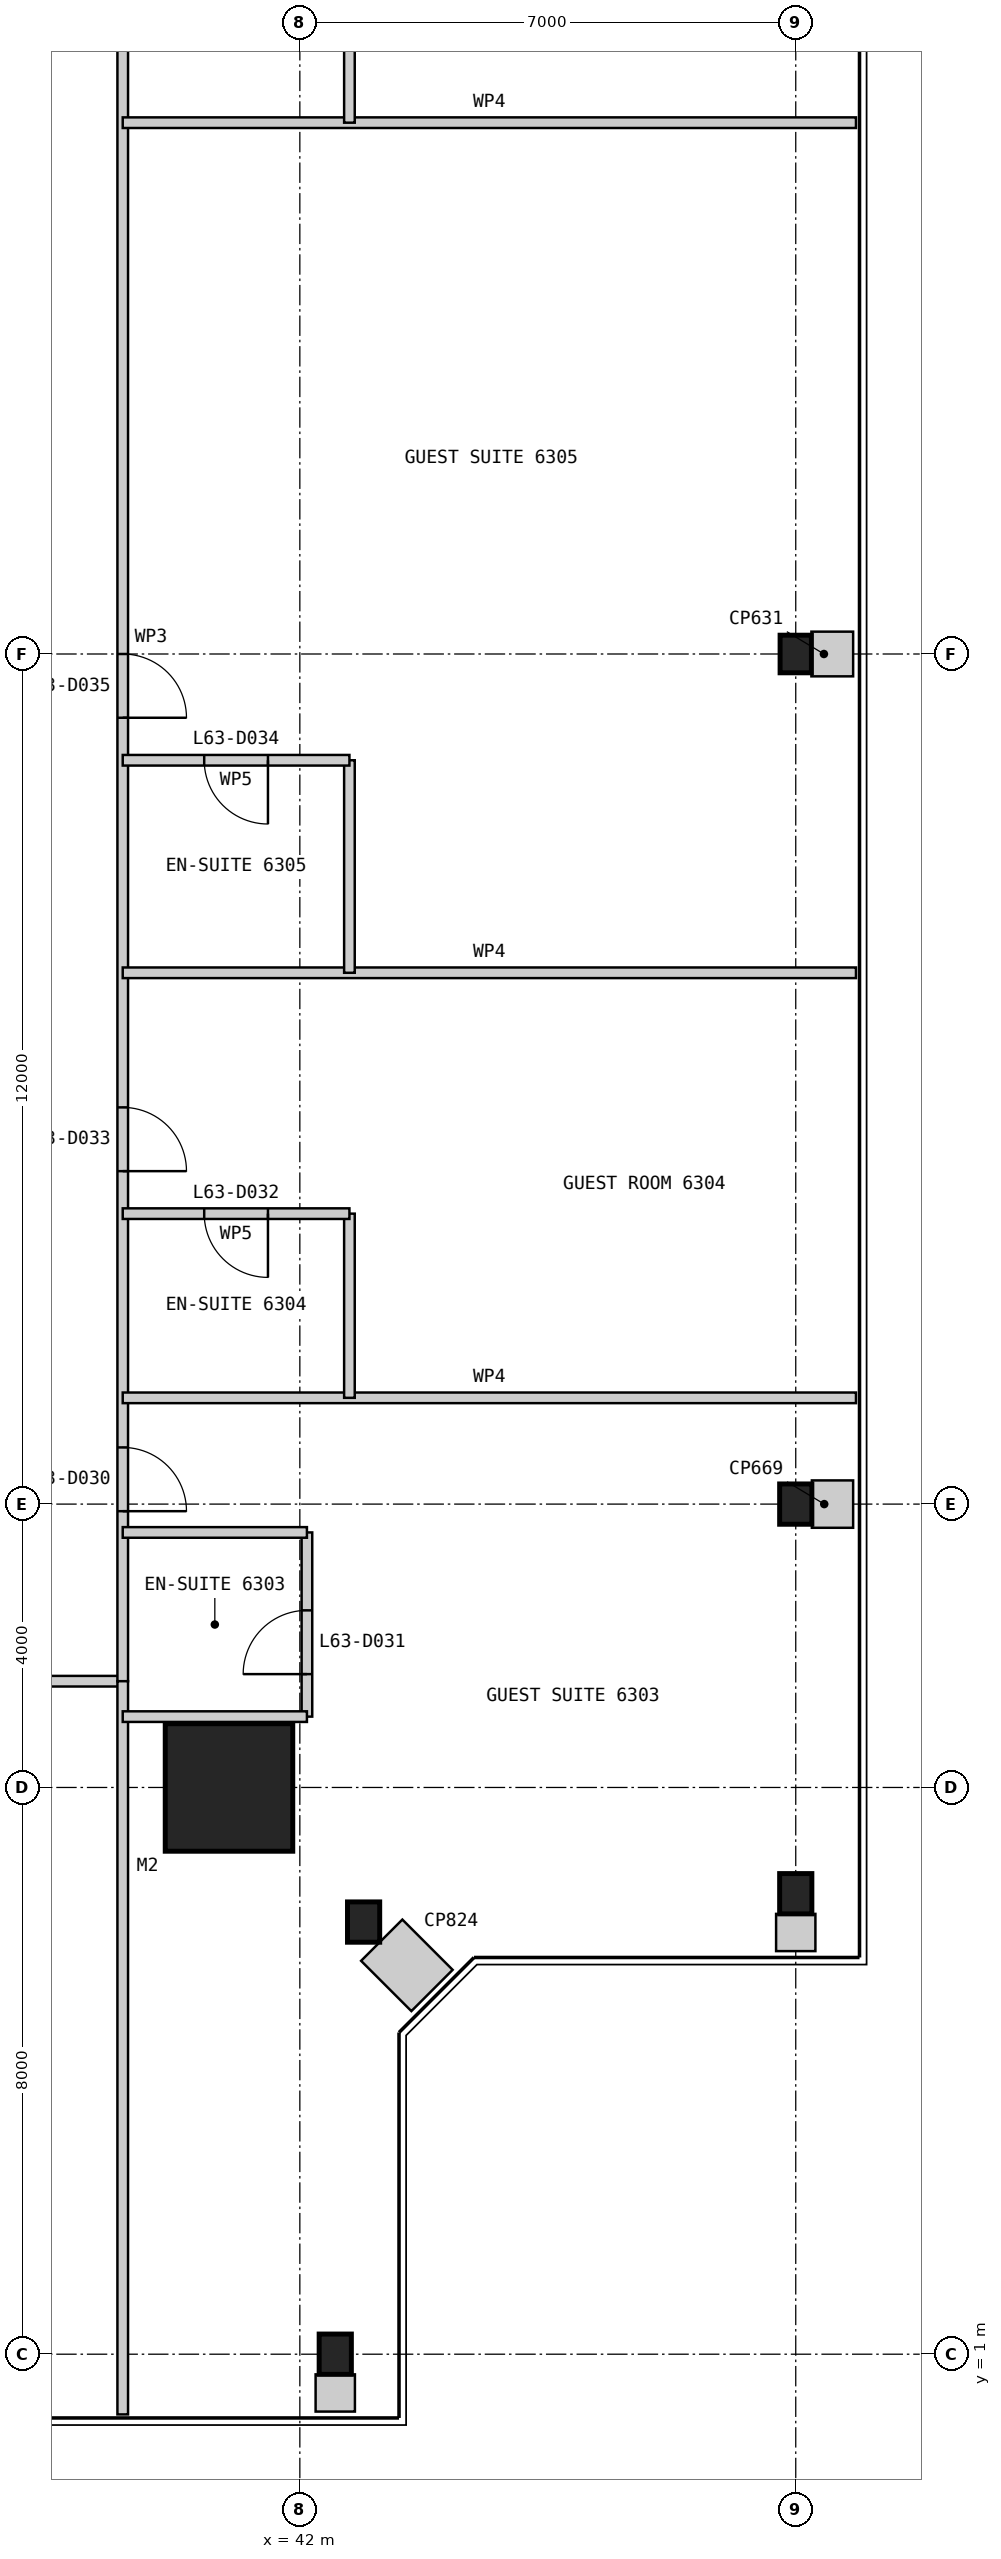
"""IFC4 building model, lengths in metres.
Left out: names, types, materials, properties, quantities, classifications, styles, units other than length and angle.
Written with IfcOpenShell. Run it as: python <this file> out.ifc"""

import sys

from ifc_helpers import new_model, si_unit, direction, frame, frame_2d, origin, origin_2d, place, context, subcontext, project, spatial, rectangle, i_section, extrude, element, fill, save


model = new_model("IFC4")
c1 = context("Model", 3, precision=1e-05, world=origin(), true_north=direction((0.0, 1.0)))
c2 = subcontext(c1, "Body", "Model", "MODEL_VIEW")
j1 = project(units=[si_unit("LENGTHUNIT", "METRE"), si_unit("PLANEANGLEUNIT", "RADIAN")], contexts=[c1])
p1 = place(None, origin())
s1 = spatial("IfcSite", under=j1, at=p1, CompositionType="ELEMENT")
p2 = place(p1, origin())
s2 = spatial("IfcBuilding", under=s1, at=p2, CompositionType="ELEMENT")
p3 = place(p2, frame((0.0, 0.0, 266.2)))
s3 = spatial("IfcBuildingStorey", under=s2, at=p3, CompositionType="ELEMENT", Elevation=266.2)
p4 = place(p3, frame((41.0, 9.0, 0.0), z_axis=(0.0, 0.0, 1.0), x_axis=(1.0, 0.0, 0.0)))
e1 = element("IfcColumn", 1, at=p4, inside=s3, PredefinedType="COLUMN", context=c2, shape_type="SweptSolid", body=[
    extrude(rectangle(XDim=1.8, YDim=1.8, at=origin_2d()), origin(), (0.0, 0.0, 1.0), 3.4),
])
for number, where, z_axis, x_axis in (
    (2, (42.5, 1.0, 0.0), (0.0, 0.0, 1.0), (1.0, 0.0, 0.0)),
    (3, (42.9, 7.1, 0.0), (0.0, 0.0, 1.0), (1.0, 0.0, 0.0)),
    (4, (49.0, 7.5, 0.0), (0.0, 0.0, 1.0), (1.0, 0.0, 0.0)),
    (5, (49.0, 13.0, 0.0), (0.0, 0.0, 1.0), (1.0, 0.0, 0.0)),
):
    element("IfcColumn", number, at=place(p3, frame(where, z_axis=z_axis, x_axis=x_axis)), inside=s3, PredefinedType="COLUMN", context=c2, shape_type="SweptSolid", body=[
        extrude(i_section(OverallWidth=0.455, OverallDepth=0.569, WebThickness=0.078, FlangeThickness=0.125, at=origin_2d()), origin(), (0.0, 0.0, 1.0), 3.4),
    ])
p5 = place(p3, frame((49.0, 25.0, 0.0), z_axis=(0.0, 0.0, 1.0), x_axis=(1.0, 0.0, 0.0)))
e6 = element("IfcColumn", 6, at=p5, inside=s3, PredefinedType="COLUMN", context=c2, shape_type="SweptSolid", body=[
    extrude(i_section(OverallWidth=0.442, OverallDepth=0.531, WebThickness=0.066, FlangeThickness=0.106, at=origin_2d()), origin(), (0.0, 0.0, 1.0), 3.4),
])
p6 = place(p3, frame((10.5, 10.5, 0.0), z_axis=(0.0, 0.0, 1.0), x_axis=(1.0, 0.0, 0.0)))
e7 = element("IfcWall", 7, at=p6, inside=s3, PredefinedType="PARTITIONING", context=c2, shape_type="SweptSolid", body=[
    extrude(rectangle(XDim=29.0, YDim=0.15, at=frame_2d((14.5, 0.0))), origin(), (0.0, 0.0, 1.0), 3.25),
])
p7 = place(p6, frame((1.85, 0.0, 0.0)))
e8 = element("IfcOpeningElement", 8, at=p7, cuts=e7, PredefinedType="OPENING", context=c2, shape_type="SweptSolid", body=[
    extrude(rectangle(XDim=1.0, YDim=2.1, at=frame_2d((0.5, 1.05))), frame((0.0, 0.085, 0.0), z_axis=(0.0, -1.0, 0.0), x_axis=(1.0, 0.0, 0.0)), (0.0, 0.0, 1.0), 0.17),
])
p8 = place(p6, frame((14.5, 0.0, 0.0)))
e9 = element("IfcOpeningElement", 9, at=p8, cuts=e7, PredefinedType="OPENING", context=c2, shape_type="SweptSolid", body=[
    extrude(rectangle(XDim=1.0, YDim=2.1, at=frame_2d((0.5, 1.05))), frame((0.0, 0.085, 0.0), z_axis=(0.0, -1.0, 0.0), x_axis=(1.0, 0.0, 0.0)), (0.0, 0.0, 1.0), 0.17),
])
p9 = place(p6, frame((19.2, 0.0, 0.0)))
e10 = element("IfcOpeningElement", 10, at=p9, cuts=e7, PredefinedType="OPENING", context=c2, shape_type="SweptSolid", body=[
    extrude(rectangle(XDim=0.9, YDim=2.1, at=frame_2d((0.45, 1.05))), frame((0.0, 0.085, 0.0), z_axis=(0.0, -1.0, 0.0), x_axis=(1.0, 0.0, 0.0)), (0.0, 0.0, 1.0), 0.17),
])
p10 = place(p6, frame((25.2, 0.0, 0.0)))
e11 = element("IfcOpeningElement", 11, at=p10, cuts=e7, PredefinedType="OPENING", context=c2, shape_type="SweptSolid", body=[
    extrude(rectangle(XDim=0.9, YDim=2.1, at=frame_2d((0.45, 1.05))), frame((0.0, 0.085, 0.0), z_axis=(0.0, -1.0, 0.0), x_axis=(1.0, 0.0, 0.0)), (0.0, 0.0, 1.0), 0.17),
])
p11 = place(p3, frame((39.5, 10.5, 0.0), z_axis=(0.0, 0.0, 1.0), x_axis=(0.0, 1.0, 0.0)))
e12 = element("IfcWall", 12, at=p11, inside=s3, PredefinedType="PARTITIONING", context=c2, shape_type="SweptSolid", body=[
    extrude(rectangle(XDim=29.0, YDim=0.15, at=frame_2d((14.5, 0.0))), origin(), (0.0, 0.0, 1.0), 3.25),
])
p12 = place(p11, frame((2.4, 0.0, 0.0)))
e13 = element("IfcOpeningElement", 13, at=p12, cuts=e12, PredefinedType="OPENING", context=c2, shape_type="SweptSolid", body=[
    extrude(rectangle(XDim=0.9, YDim=2.1, at=frame_2d((0.45, 1.05))), frame((0.0, 0.085, 0.0), z_axis=(0.0, -1.0, 0.0), x_axis=(1.0, 0.0, 0.0)), (0.0, 0.0, 1.0), 0.17),
])
p13 = place(p11, frame((7.2, 0.0, 0.0)))
e14 = element("IfcOpeningElement", 14, at=p13, cuts=e12, PredefinedType="OPENING", context=c2, shape_type="SweptSolid", body=[
    extrude(rectangle(XDim=0.9, YDim=2.1, at=frame_2d((0.45, 1.05))), frame((0.0, 0.085, 0.0), z_axis=(0.0, -1.0, 0.0), x_axis=(1.0, 0.0, 0.0)), (0.0, 0.0, 1.0), 0.17),
])
p14 = place(p11, frame((13.6, 0.0, 0.0)))
e15 = element("IfcOpeningElement", 15, at=p14, cuts=e12, PredefinedType="OPENING", context=c2, shape_type="SweptSolid", body=[
    extrude(rectangle(XDim=0.9, YDim=2.1, at=frame_2d((0.45, 1.05))), frame((0.0, 0.085, 0.0), z_axis=(0.0, -1.0, 0.0), x_axis=(1.0, 0.0, 0.0)), (0.0, 0.0, 1.0), 0.17),
])
p15 = place(p11, frame((25.2, 0.0, 0.0)))
e16 = element("IfcOpeningElement", 16, at=p15, cuts=e12, PredefinedType="OPENING", context=c2, shape_type="SweptSolid", body=[
    extrude(rectangle(XDim=0.9, YDim=2.1, at=frame_2d((0.45, 1.05))), frame((0.0, 0.085, 0.0), z_axis=(0.0, -1.0, 0.0), x_axis=(1.0, 0.0, 0.0)), (0.0, 0.0, 1.0), 0.17),
])
p16 = place(p3, frame((39.5, 0.15, 0.0), z_axis=(0.0, 0.0, 1.0), x_axis=(0.0, 1.0, 0.0)))
e17 = element("IfcWall", 17, at=p16, inside=s3, PredefinedType="PARTITIONING", context=c2, shape_type="SweptSolid", body=[
    extrude(rectangle(XDim=10.35, YDim=0.15, at=frame_2d((5.175, 0.0))), origin(), (0.0, 0.0, 1.0), 3.25),
])
p17 = place(p3, frame((42.1, 10.0, 0.0), z_axis=(0.0, 0.0, 1.0), x_axis=(0.0, 1.0, 0.0)))
e18 = element("IfcWall", 18, at=p17, inside=s3, PredefinedType="PARTITIONING", context=c2, shape_type="SweptSolid", body=[
    extrude(rectangle(XDim=2.6, YDim=0.15, at=frame_2d((1.3, 0.0))), origin(), (0.0, 0.0, 1.0), 3.25),
])
p18 = place(p17, frame((0.6, 0.0, 0.0)))
e19 = element("IfcOpeningElement", 19, at=p18, cuts=e18, PredefinedType="OPENING", context=c2, shape_type="SweptSolid", body=[
    extrude(rectangle(XDim=0.9, YDim=2.1, at=frame_2d((0.45, 1.05))), frame((0.0, 0.085, 0.0), z_axis=(0.0, -1.0, 0.0), x_axis=(1.0, 0.0, 0.0)), (0.0, 0.0, 1.0), 0.17),
])
for number, where, z_axis, x_axis in (
    (20, (42.1, 10.0, 0.0), (0.0, 0.0, 1.0), (-1.0, 0.0, 0.0)),
    (21, (42.1, 12.6, 0.0), (0.0, 0.0, 1.0), (-1.0, 0.0, 0.0)),
):
    element("IfcWall", number, at=place(p3, frame(where, z_axis=z_axis, x_axis=x_axis)), inside=s3, PredefinedType="PARTITIONING", context=c2, shape_type="SweptSolid", body=[
        extrude(rectangle(XDim=2.6, YDim=0.15, at=frame_2d((1.3, 0.0))), origin(), (0.0, 0.0, 1.0), 3.25),
    ])
p19 = place(p3, frame((49.85, 14.5, 0.0), z_axis=(0.0, 0.0, 1.0), x_axis=(-1.0, 0.0, 0.0)))
e22 = element("IfcWall", 22, at=p19, inside=s3, PredefinedType="PARTITIONING", context=c2, shape_type="SweptSolid", body=[
    extrude(rectangle(XDim=10.35, YDim=0.15, at=frame_2d((5.175, 0.0))), origin(), (0.0, 0.0, 1.0), 3.25),
])
p20 = place(p3, frame((42.7, 14.5, 0.0), z_axis=(0.0, 0.0, 1.0), x_axis=(0.0, 1.0, 0.0)))
e23 = element("IfcWall", 23, at=p20, inside=s3, PredefinedType="PARTITIONING", context=c2, shape_type="SweptSolid", body=[
    extrude(rectangle(XDim=2.6, YDim=0.15, at=frame_2d((1.3, 0.0))), origin(), (0.0, 0.0, 1.0), 3.25),
])
p21 = place(p3, frame((42.7, 17.1, 0.0), z_axis=(0.0, 0.0, 1.0), x_axis=(-1.0, 0.0, 0.0)))
e24 = element("IfcWall", 24, at=p21, inside=s3, PredefinedType="PARTITIONING", context=c2, shape_type="SweptSolid", body=[
    extrude(rectangle(XDim=3.2, YDim=0.15, at=frame_2d((1.6, 0.0))), origin(), (0.0, 0.0, 1.0), 3.25),
])
p22 = place(p21, frame((1.15, 0.0, 0.0)))
e25 = element("IfcOpeningElement", 25, at=p22, cuts=e24, PredefinedType="OPENING", context=c2, shape_type="SweptSolid", body=[
    extrude(rectangle(XDim=0.9, YDim=2.1, at=frame_2d((0.45, 1.05))), frame((0.0, 0.085, 0.0), z_axis=(0.0, -1.0, 0.0), x_axis=(1.0, 0.0, 0.0)), (0.0, 0.0, 1.0), 0.17),
])
p23 = place(p3, frame((49.85, 20.5, 0.0), z_axis=(0.0, 0.0, 1.0), x_axis=(-1.0, 0.0, 0.0)))
e26 = element("IfcWall", 26, at=p23, inside=s3, PredefinedType="PARTITIONING", context=c2, shape_type="SweptSolid", body=[
    extrude(rectangle(XDim=10.35, YDim=0.15, at=frame_2d((5.175, 0.0))), origin(), (0.0, 0.0, 1.0), 3.25),
])
p24 = place(p3, frame((42.7, 20.5, 0.0), z_axis=(0.0, 0.0, 1.0), x_axis=(0.0, 1.0, 0.0)))
e27 = element("IfcWall", 27, at=p24, inside=s3, PredefinedType="PARTITIONING", context=c2, shape_type="SweptSolid", body=[
    extrude(rectangle(XDim=3.0, YDim=0.15, at=frame_2d((1.5, 0.0))), origin(), (0.0, 0.0, 1.0), 3.25),
])
p25 = place(p3, frame((42.7, 23.5, 0.0), z_axis=(0.0, 0.0, 1.0), x_axis=(-1.0, 0.0, 0.0)))
e28 = element("IfcWall", 28, at=p25, inside=s3, PredefinedType="PARTITIONING", context=c2, shape_type="SweptSolid", body=[
    extrude(rectangle(XDim=3.2, YDim=0.15, at=frame_2d((1.6, 0.0))), origin(), (0.0, 0.0, 1.0), 3.25),
])
p26 = place(p25, frame((1.15, 0.0, 0.0)))
e29 = element("IfcOpeningElement", 29, at=p26, cuts=e28, PredefinedType="OPENING", context=c2, shape_type="SweptSolid", body=[
    extrude(rectangle(XDim=0.9, YDim=2.1, at=frame_2d((0.45, 1.05))), frame((0.0, 0.085, 0.0), z_axis=(0.0, -1.0, 0.0), x_axis=(1.0, 0.0, 0.0)), (0.0, 0.0, 1.0), 0.17),
])
p27 = place(p3, frame((49.85, 32.5, 0.0), z_axis=(0.0, 0.0, 1.0), x_axis=(-1.0, 0.0, 0.0)))
e30 = element("IfcWall", 30, at=p27, inside=s3, PredefinedType="PARTITIONING", context=c2, shape_type="SweptSolid", body=[
    extrude(rectangle(XDim=10.35, YDim=0.15, at=frame_2d((5.175, 0.0))), origin(), (0.0, 0.0, 1.0), 3.25),
])
p28 = place(p3, frame((42.7, 32.5, 0.0), z_axis=(0.0, 0.0, 1.0), x_axis=(0.0, 1.0, 0.0)))
e31 = element("IfcWall", 31, at=p28, inside=s3, PredefinedType="PARTITIONING", context=c2, shape_type="SweptSolid", body=[
    extrude(rectangle(XDim=2.6, YDim=0.15, at=frame_2d((1.3, 0.0))), origin(), (0.0, 0.0, 1.0), 3.25),
])
p29 = place(p3, frame((42.5, 0.19, 0.0), z_axis=(0.0, 0.0, 1.0), x_axis=(0.0, 1.0, 0.0)))
e32 = element("IfcWall", 32, at=p29, inside=s3, PredefinedType="PARTITIONING", context=c2, shape_type="SweptSolid", body=[
    extrude(rectangle(XDim=0.526, YDim=0.555, at=frame_2d((0.263, 0.0))), origin(), (0.0, 0.0, 1.0), 3.25),
])
p30 = place(p3, frame((43.866, 6.134, 0.0), z_axis=(0.0, 0.0, 1.0), x_axis=(-0.707106781187, 0.707106781187, 0.0)))
e33 = element("IfcWall", 33, at=p30, inside=s3, PredefinedType="PARTITIONING", context=c2, shape_type="SweptSolid", body=[
    extrude(rectangle(XDim=1.004, YDim=0.824, at=frame_2d((0.502, 0.0))), origin(), (0.0, 0.0, 1.0), 3.25),
])
p31 = place(p3, frame((49.0, 6.69, 0.0), z_axis=(0.0, 0.0, 1.0), x_axis=(0.0, 1.0, 0.0)))
e34 = element("IfcWall", 34, at=p31, inside=s3, PredefinedType="PARTITIONING", context=c2, shape_type="SweptSolid", body=[
    extrude(rectangle(XDim=0.526, YDim=0.555, at=frame_2d((0.263, 0.0))), origin(), (0.0, 0.0, 1.0), 3.25),
])
p32 = place(p3, frame((49.81, 13.0, 0.0), z_axis=(0.0, 0.0, 1.0), x_axis=(-1.0, 0.0, 0.0)))
e35 = element("IfcWall", 35, at=p32, inside=s3, PredefinedType="PARTITIONING", context=c2, shape_type="SweptSolid", body=[
    extrude(rectangle(XDim=0.583, YDim=0.669, at=frame_2d((0.292, 0.0))), origin(), (0.0, 0.0, 1.0), 3.25),
])
p33 = place(p3, frame((49.81, 25.0, 0.0), z_axis=(0.0, 0.0, 1.0), x_axis=(-1.0, 0.0, 0.0)))
e36 = element("IfcWall", 36, at=p33, inside=s3, PredefinedType="PARTITIONING", context=c2, shape_type="SweptSolid", body=[
    extrude(rectangle(XDim=0.589, YDim=0.631, at=frame_2d((0.294, 0.0))), origin(), (0.0, 0.0, 1.0), 3.25),
])
p34 = place(p12, frame((0.9, 0.0, 0.0), z_axis=(0.0, 0.0, 1.0), x_axis=(-1.0, 0.0, 0.0)))
e37 = element("IfcDoor", 37, at=p34, inside=s3, OperationType="SINGLE_SWING_RIGHT", PredefinedType="DOOR", context=c2, shape_type="SweptSolid", body=[
    extrude(rectangle(XDim=0.9, YDim=2.1, at=frame_2d((0.45, 1.05))), frame((0.0, 0.025, 0.0), z_axis=(0.0, -1.0, 0.0), x_axis=(1.0, 0.0, 0.0)), (0.0, 0.0, 1.0), 0.05),
])
fill(e13, e37)
p35 = place(p18, origin())
e38 = element("IfcDoor", 38, at=p35, inside=s3, OperationType="SINGLE_SWING_LEFT", PredefinedType="DOOR", context=c2, shape_type="SweptSolid", body=[
    extrude(rectangle(XDim=0.9, YDim=2.1, at=frame_2d((0.45, 1.05))), frame((0.0, 0.025, 0.0), z_axis=(0.0, -1.0, 0.0), x_axis=(1.0, 0.0, 0.0)), (0.0, 0.0, 1.0), 0.05),
])
fill(e19, e38)
p36 = place(p22, origin())
e39 = element("IfcDoor", 39, at=p36, inside=s3, OperationType="SINGLE_SWING_LEFT", PredefinedType="DOOR", context=c2, shape_type="SweptSolid", body=[
    extrude(rectangle(XDim=0.9, YDim=2.1, at=frame_2d((0.45, 1.05))), frame((0.0, 0.025, 0.0), z_axis=(0.0, -1.0, 0.0), x_axis=(1.0, 0.0, 0.0)), (0.0, 0.0, 1.0), 0.05),
])
fill(e25, e39)
p37 = place(p13, frame((0.9, 0.0, 0.0), z_axis=(0.0, 0.0, 1.0), x_axis=(-1.0, 0.0, 0.0)))
e40 = element("IfcDoor", 40, at=p37, inside=s3, OperationType="SINGLE_SWING_RIGHT", PredefinedType="DOOR", context=c2, shape_type="SweptSolid", body=[
    extrude(rectangle(XDim=0.9, YDim=2.1, at=frame_2d((0.45, 1.05))), frame((0.0, 0.025, 0.0), z_axis=(0.0, -1.0, 0.0), x_axis=(1.0, 0.0, 0.0)), (0.0, 0.0, 1.0), 0.05),
])
fill(e14, e40)
p38 = place(p26, origin())
e41 = element("IfcDoor", 41, at=p38, inside=s3, OperationType="SINGLE_SWING_LEFT", PredefinedType="DOOR", context=c2, shape_type="SweptSolid", body=[
    extrude(rectangle(XDim=0.9, YDim=2.1, at=frame_2d((0.45, 1.05))), frame((0.0, 0.025, 0.0), z_axis=(0.0, -1.0, 0.0), x_axis=(1.0, 0.0, 0.0)), (0.0, 0.0, 1.0), 0.05),
])
fill(e29, e41)
p39 = place(p14, frame((0.9, 0.0, 0.0), z_axis=(0.0, 0.0, 1.0), x_axis=(-1.0, 0.0, 0.0)))
e42 = element("IfcDoor", 42, at=p39, inside=s3, OperationType="SINGLE_SWING_RIGHT", PredefinedType="DOOR", context=c2, shape_type="SweptSolid", body=[
    extrude(rectangle(XDim=0.9, YDim=2.1, at=frame_2d((0.45, 1.05))), frame((0.0, 0.025, 0.0), z_axis=(0.0, -1.0, 0.0), x_axis=(1.0, 0.0, 0.0)), (0.0, 0.0, 1.0), 0.05),
])
fill(e15, e42)
save(model, sys.argv[1])
